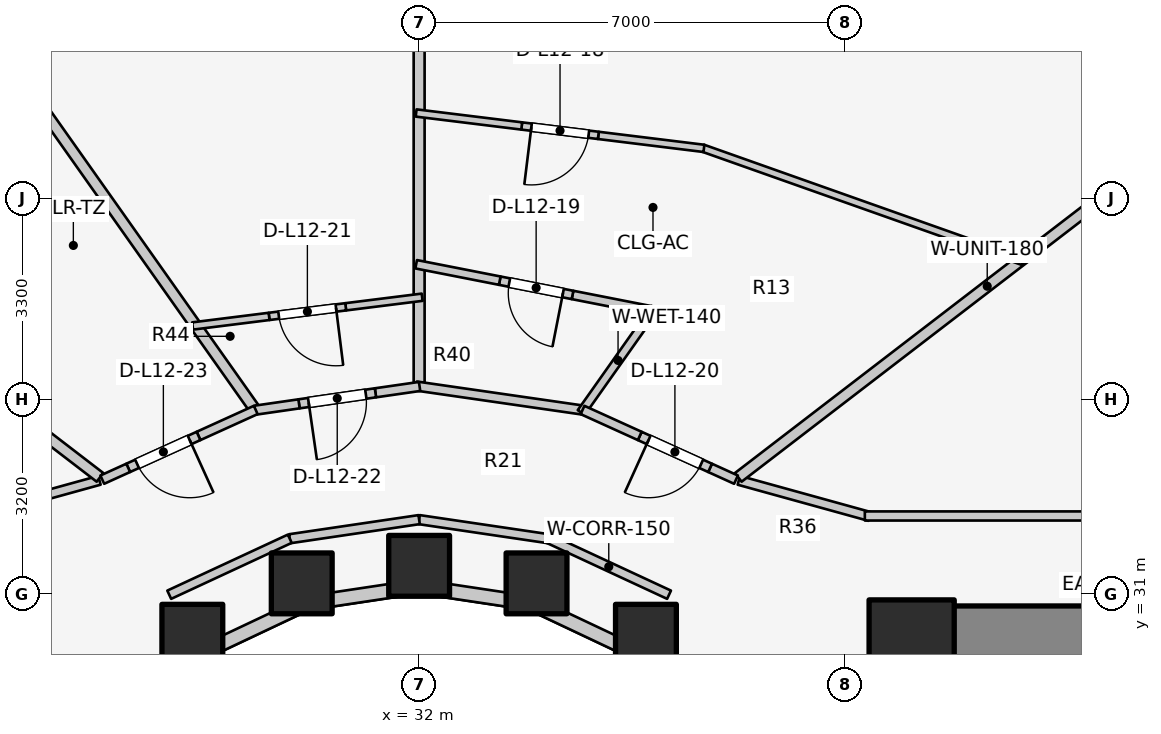
"""IFC4 building model, lengths in metres.
Left out: names, types, materials, properties, quantities, classifications, styles, units other than length and angle.
Written with IfcOpenShell. Run it as: python <this file> out.ifc"""

import sys

from ifc_helpers import new_model, si_unit, direction, frame, frame_2d, origin, origin_2d, place, context, subcontext, project, spatial, rectangle, extrude, element, fill, save


model = new_model("IFC4")
c1 = context("Model", 3, precision=1e-05, world=origin(), true_north=direction((0.0, 1.0)))
c2 = subcontext(c1, "Body", "Model", "MODEL_VIEW")
j1 = project(units=[si_unit("LENGTHUNIT", "METRE"), si_unit("PLANEANGLEUNIT", "RADIAN")], contexts=[c1])
p1 = place(None, origin())
s1 = spatial("IfcSite", under=j1, at=p1, CompositionType="ELEMENT")
p2 = place(p1, origin())
s2 = spatial("IfcBuilding", under=s1, at=p2, CompositionType="ELEMENT")
p3 = place(p2, frame((0.0, 0.0, 43.1)))
s3 = spatial("IfcBuildingStorey", under=s2, at=p3, CompositionType="ELEMENT", Elevation=43.1)
p4 = place(p3, frame((39.85, 30.35, 0.0), z_axis=(0.0, 0.0, 1.0), x_axis=(1.0, 0.0, 0.0)))
e1 = element("IfcWall", 1, at=p4, inside=s3, PredefinedType="SHEAR", context=c2, shape_type="SweptSolid", body=[
    extrude(rectangle(XDim=4.5, YDim=0.9, at=frame_2d((2.25, 0.0))), origin(), (0.0, 0.0, 1.0), 3.1),
])
p5 = place(p3, frame((40.1, 30.2, 0.0), z_axis=(0.0, 0.0, 1.0), x_axis=(1.0, 0.0, 0.0)))
e2 = element("IfcColumn", 2, at=p5, inside=s3, PredefinedType="COLUMN", context=c2, shape_type="SweptSolid", body=[
    extrude(rectangle(XDim=1.4, YDim=1.4, at=origin_2d()), origin(), (0.0, 0.0, 1.0), 3.1),
])
for number, where, z_axis, x_axis in (
    (3, (35.73, 30.327, 0.0), (0.0, 0.0, 1.0), (1.0, 0.0, 0.0)),
    (4, (33.931, 31.172, 0.0), (0.0, 0.0, 1.0), (1.0, 0.0, 0.0)),
    (5, (32.0, 31.46, 0.0), (0.0, 0.0, 1.0), (1.0, 0.0, 0.0)),
    (6, (30.069, 31.172, 0.0), (0.0, 0.0, 1.0), (1.0, 0.0, 0.0)),
    (7, (28.27, 30.327, 0.0), (0.0, 0.0, 1.0), (1.0, 0.0, 0.0)),
):
    element("IfcColumn", number, at=place(p3, frame(where, z_axis=z_axis, x_axis=x_axis)), inside=s3, PredefinedType="COLUMN", context=c2, shape_type="SweptSolid", body=[
        extrude(rectangle(XDim=1.0, YDim=1.0, at=origin_2d()), origin(), (0.0, 0.0, 1.0), 3.1),
    ])
p6 = place(p3, frame((37.035, 28.742, 0.0), z_axis=(0.0, 0.0, 1.0), x_axis=(-0.752576694707, 0.658504607869, 0.0)))
e8 = element("IfcWall", 8, at=p6, inside=s3, PredefinedType="STANDARD", context=c2, shape_type="SweptSolid", body=[
    extrude(rectangle(XDim=1.959, YDim=0.23, at=frame_2d((0.98, 0.0))), origin(), (0.0, 0.0, 1.0), 1.22),
])
p7 = place(p3, frame((35.56, 30.032, 0.0), z_axis=(0.0, 0.0, 1.0), x_axis=(-0.904179699603, 0.427152280606, 0.0)))
e9 = element("IfcWall", 9, at=p7, inside=s3, PredefinedType="STANDARD", context=c2, shape_type="SweptSolid", body=[
    extrude(rectangle(XDim=1.899, YDim=0.23, at=frame_2d((0.95, 0.0))), origin(), (0.0, 0.0, 1.0), 1.22),
])
for number, where, z_axis, x_axis in (
    (10, (33.843, 30.843, 0.0), (0.0, 0.0, 1.0), (-0.989, 0.149, 0.0)),
    (11, (32.0, 31.12, 0.0), (0.0, 0.0, 1.0), (-0.989, -0.149, 0.0)),
):
    element("IfcWall", number, at=place(p3, frame(where, z_axis=z_axis, x_axis=x_axis)), inside=s3, PredefinedType="STANDARD", context=c2, shape_type="SweptSolid", body=[
        extrude(rectangle(XDim=1.864, YDim=0.23, at=frame_2d((0.932, 0.0))), origin(), (0.0, 0.0, 1.0), 1.22),
    ])
p8 = place(p3, frame((30.157, 30.843, 0.0), z_axis=(0.0, 0.0, 1.0), x_axis=(-0.904179699603, -0.427152280606, 0.0)))
e12 = element("IfcWall", 12, at=p8, inside=s3, PredefinedType="STANDARD", context=c2, shape_type="SweptSolid", body=[
    extrude(rectangle(XDim=1.899, YDim=0.23, at=frame_2d((0.95, 0.0))), origin(), (0.0, 0.0, 1.0), 1.22),
])
p9 = place(p3, frame((28.44, 30.032, 0.0), z_axis=(0.0, 0.0, 1.0), x_axis=(-0.752576694707, -0.658504607869, 0.0)))
e13 = element("IfcWall", 13, at=p9, inside=s3, PredefinedType="STANDARD", context=c2, shape_type="SweptSolid", body=[
    extrude(rectangle(XDim=1.959, YDim=0.23, at=frame_2d((0.98, 0.0))), origin(), (0.0, 0.0, 1.0), 1.22),
])
p10 = place(p3, frame((36.11, 30.985, 0.0), z_axis=(0.0, 0.0, 1.0), x_axis=(-0.906943449489, 0.421252393975, 0.0)))
e14 = element("IfcWall", 14, at=p10, inside=s3, PredefinedType="PARTITIONING", context=c2, shape_type="SweptSolid", body=[
    extrude(rectangle(XDim=2.186, YDim=0.15, at=frame_2d((1.093, 0.0))), origin(), (0.0, 0.0, 1.0), 1.22),
])
for number, where, z_axis, x_axis in (
    (15, (34.127, 31.906, 0.0), (0.0, 0.0, 1.0), (-0.989, 0.146, 0.0)),
    (16, (32.0, 32.22, 0.0), (0.0, 0.0, 1.0), (-0.989, -0.146, 0.0)),
):
    element("IfcWall", number, at=place(p3, frame(where, z_axis=z_axis, x_axis=x_axis)), inside=s3, PredefinedType="PARTITIONING", context=c2, shape_type="SweptSolid", body=[
        extrude(rectangle(XDim=2.151, YDim=0.15, at=frame_2d((1.075, 0.0))), origin(), (0.0, 0.0, 1.0), 1.22),
    ])
p11 = place(p3, frame((29.873, 31.906, 0.0), z_axis=(0.0, 0.0, 1.0), x_axis=(-0.906943449489, -0.421252393975, 0.0)))
e17 = element("IfcWall", 17, at=p11, inside=s3, PredefinedType="PARTITIONING", context=c2, shape_type="SweptSolid", body=[
    extrude(rectangle(XDim=2.186, YDim=0.15, at=frame_2d((1.093, 0.0))), origin(), (0.0, 0.0, 1.0), 1.22),
])
p12 = place(p3, frame((37.258, 32.867, 0.0), z_axis=(0.0, 0.0, 1.0), x_axis=(0.963833843713, -0.266503886865, 0.0)))
e18 = element("IfcWall", 18, at=p12, inside=s3, PredefinedType="PARTITIONING", context=c2, shape_type="SweptSolid", body=[
    extrude(rectangle(XDim=2.232, YDim=0.15, at=frame_2d((1.116, 0.0))), origin(), (0.0, 0.0, 1.0), 1.22),
])
p13 = place(p3, frame((39.33, 32.28, 0.0), z_axis=(0.0, 0.0, 1.0), x_axis=(1.0, 0.0, 0.0)))
e19 = element("IfcWall", 19, at=p13, inside=s3, PredefinedType="PARTITIONING", context=c2, shape_type="SweptSolid", body=[
    extrude(rectangle(XDim=5.06, YDim=0.15, at=frame_2d((2.53, 0.0))), origin(), (0.0, 0.0, 1.0), 1.22),
])
p14 = place(p3, frame((26.742, 32.867, 0.0), z_axis=(0.0, 0.0, 1.0), x_axis=(-0.963833843713, -0.266503886865, 0.0)))
e20 = element("IfcWall", 20, at=p14, inside=s3, PredefinedType="PARTITIONING", context=c2, shape_type="SweptSolid", body=[
    extrude(rectangle(XDim=2.232, YDim=0.15, at=frame_2d((1.116, 0.0))), origin(), (0.0, 0.0, 1.0), 1.22),
])
p15 = place(p3, frame((37.249, 32.915, 0.0), z_axis=(0.0, 0.0, 1.0), x_axis=(0.793181014702, 0.608985942298, 0.0)))
e21 = element("IfcWall", 21, at=p15, inside=s3, PredefinedType="PARTITIONING", context=c2, shape_type="SweptSolid", body=[
    extrude(rectangle(XDim=10.324, YDim=0.18, at=frame_2d((5.162, 0.0))), origin(), (0.0, 0.0, 1.0), 1.22),
])
p16 = place(p3, frame((32.0, 34.465, 0.0), z_axis=(0.0, 0.0, 1.0), x_axis=(0.0, 1.0, 0.0)))
e22 = element("IfcWall", 22, at=p16, inside=s3, PredefinedType="PARTITIONING", context=c2, shape_type="SweptSolid", body=[
    extrude(rectangle(XDim=7.835, YDim=0.18, at=frame_2d((3.917, 0.0))), origin(), (0.0, 0.0, 1.0), 1.22),
])
p17 = place(p3, frame((29.274, 34.066, 0.0), z_axis=(0.0, 0.0, 1.0), x_axis=(-0.577036915124, 0.816718065543, 0.0)))
e23 = element("IfcWall", 23, at=p17, inside=s3, PredefinedType="PARTITIONING", context=c2, shape_type="SweptSolid", body=[
    extrude(rectangle(XDim=9.131, YDim=0.18, at=frame_2d((4.565, 0.0))), origin(), (0.0, 0.0, 1.0), 1.22),
])
p18 = place(p3, frame((26.751, 32.915, 0.0), z_axis=(0.0, 0.0, 1.0), x_axis=(-0.793181014702, 0.608985942298, 0.0)))
e24 = element("IfcWall", 24, at=p18, inside=s3, PredefinedType="PARTITIONING", context=c2, shape_type="SweptSolid", body=[
    extrude(rectangle(XDim=10.324, YDim=0.18, at=frame_2d((5.162, 0.0))), origin(), (0.0, 0.0, 1.0), 1.22),
])
p19 = place(p3, frame((41.938, 36.462, 0.0), z_axis=(0.0, 0.0, 1.0), x_axis=(-0.942654689305, 0.333769586287, 0.0)))
e25 = element("IfcWall", 25, at=p19, inside=s3, PredefinedType="MOVABLE", context=c2, shape_type="SweptSolid", body=[
    extrude(rectangle(XDim=5.594, YDim=0.12, at=frame_2d((2.797, 0.0))), origin(), (0.0, 0.0, 1.0), 1.22),
])
p20 = place(p3, frame((36.684, 38.325, 0.0), z_axis=(0.0, 0.0, 1.0), x_axis=(-0.992516476292, 0.122110786945, 0.0)))
e26 = element("IfcWall", 26, at=p20, inside=s3, PredefinedType="MOVABLE", context=c2, shape_type="SweptSolid", body=[
    extrude(rectangle(XDim=1.75, YDim=0.12, at=frame_2d((0.875, 0.0))), origin(), (0.0, 0.0, 1.0), 2.575),
])
p21 = place(p3, frame((34.948, 38.539, 0.0), z_axis=(0.0, 0.0, 1.0), x_axis=(-0.992544679326, 0.121881333855, 0.0)))
e27 = element("IfcWall", 27, at=p21, inside=s3, PredefinedType="MOVABLE", context=c2, shape_type="SweptSolid", body=[
    extrude(rectangle(XDim=1.27, YDim=0.12, at=frame_2d((0.635, 0.0))), origin(), (0.0, 0.0, 1.0), 2.575),
])
p22 = place(p21, frame((0.16, 0.0, 0.0)))
e28 = element("IfcOpeningElement", 28, at=p22, cuts=e27, PredefinedType="OPENING", context=c2, shape_type="SweptSolid", body=[
    extrude(rectangle(XDim=0.95, YDim=2.1, at=frame_2d((0.475, 1.05))), frame((0.0, 0.07, 0.0), z_axis=(0.0, -1.0, 0.0), x_axis=(1.0, 0.0, 0.0)), (0.0, 0.0, 1.0), 0.14),
])
p23 = place(p3, frame((33.687, 38.694, 0.0), z_axis=(0.0, 0.0, 1.0), x_axis=(-0.992518556774, 0.122093875605, 0.0)))
e29 = element("IfcWall", 29, at=p23, inside=s3, PredefinedType="MOVABLE", context=c2, shape_type="SweptSolid", body=[
    extrude(rectangle(XDim=1.75, YDim=0.12, at=frame_2d((0.875, 0.0))), origin(), (0.0, 0.0, 1.0), 1.22),
])
p24 = place(p3, frame((34.744, 34.014, 0.0), z_axis=(0.0, 0.0, 1.0), x_axis=(-0.989761784218, 0.142729150844, 0.0)))
e30 = element("IfcWall", 30, at=p24, inside=s3, PredefinedType="PARTITIONING", context=c2, shape_type="SweptSolid", body=[
    extrude(rectangle(XDim=2.822, YDim=0.15, at=frame_2d((1.411, 0.0))), origin(), (0.0, 0.0, 1.0), 1.22),
])
p25 = place(p3, frame((34.665, 33.98, 0.0), z_axis=(0.0, 0.0, 1.0), x_axis=(0.577139575342, 0.816645523207, 0.0)))
e31 = element("IfcWall", 31, at=p25, inside=s3, PredefinedType="PLUMBINGWALL", context=c2, shape_type="SweptSolid", body=[
    extrude(rectangle(XDim=2.1, YDim=0.14, at=frame_2d((1.05, 0.0))), origin(), (0.0, 0.0, 1.0), 2.575),
])
p26 = place(p3, frame((35.897, 35.645, 0.0), z_axis=(0.0, 0.0, 1.0), x_axis=(-0.981284705137, 0.192562528712, 0.0)))
e32 = element("IfcWall", 32, at=p26, inside=s3, PredefinedType="PLUMBINGWALL", context=c2, shape_type="SweptSolid", body=[
    extrude(rectangle(XDim=1.401, YDim=0.14, at=frame_2d((0.7, 0.0))), origin(), (0.0, 0.0, 1.0), 1.22),
])
p27 = place(p3, frame((34.523, 35.915, 0.0), z_axis=(0.0, 0.0, 1.0), x_axis=(-0.981252199958, 0.192728098829, 0.0)))
e33 = element("IfcWall", 33, at=p27, inside=s3, PredefinedType="PLUMBINGWALL", context=c2, shape_type="SweptSolid", body=[
    extrude(rectangle(XDim=1.22, YDim=0.14, at=frame_2d((0.61, 0.0))), origin(), (0.0, 0.0, 1.0), 2.575),
])
p28 = place(p27, frame((0.16, 0.0, 0.0)))
e34 = element("IfcOpeningElement", 34, at=p28, cuts=e33, PredefinedType="OPENING", context=c2, shape_type="SweptSolid", body=[
    extrude(rectangle(XDim=0.9, YDim=2.1, at=frame_2d((0.45, 1.05))), frame((0.0, 0.08, 0.0), z_axis=(0.0, -1.0, 0.0), x_axis=(1.0, 0.0, 0.0)), (0.0, 0.0, 1.0), 0.16),
])
p29 = place(p3, frame((33.326, 36.15, 0.0), z_axis=(0.0, 0.0, 1.0), x_axis=(-0.981284705137, 0.192562528712, 0.0)))
e35 = element("IfcWall", 35, at=p29, inside=s3, PredefinedType="PLUMBINGWALL", context=c2, shape_type="SweptSolid", body=[
    extrude(rectangle(XDim=1.401, YDim=0.14, at=frame_2d((0.7, 0.0))), origin(), (0.0, 0.0, 1.0), 1.22),
])
p30 = place(p3, frame((37.211, 32.877, 0.0), z_axis=(0.0, 0.0, 1.0), x_axis=(-0.910580557663, 0.413331644091, 0.0)))
e36 = element("IfcWall", 36, at=p30, inside=s3, PredefinedType="PARTITIONING", context=c2, shape_type="SweptSolid", body=[
    extrude(rectangle(XDim=0.469, YDim=0.15, at=frame_2d((0.234, 0.0))), origin(), (0.0, 0.0, 1.0), 2.575),
])
p31 = place(p3, frame((36.785, 33.071, 0.0), z_axis=(0.0, 0.0, 1.0), x_axis=(-0.910491529429, 0.413527719553, 0.0)))
e37 = element("IfcWall", 37, at=p31, inside=s3, PredefinedType="PARTITIONING", context=c2, shape_type="SweptSolid", body=[
    extrude(rectangle(XDim=1.27, YDim=0.15, at=frame_2d((0.635, 0.0))), origin(), (0.0, 0.0, 1.0), 2.16),
])
p32 = place(p31, frame((0.16, 0.0, 0.0)))
e38 = element("IfcOpeningElement", 38, at=p32, cuts=e37, PredefinedType="OPENING", context=c2, shape_type="SweptSolid", body=[
    extrude(rectangle(XDim=0.95, YDim=2.1, at=frame_2d((0.475, 1.05))), frame((0.0, 0.085, 0.0), z_axis=(0.0, -1.0, 0.0), x_axis=(1.0, 0.0, 0.0)), (0.0, 0.0, 1.0), 0.17),
])
p33 = place(p3, frame((35.628, 33.596, 0.0), z_axis=(0.0, 0.0, 1.0), x_axis=(-0.910657491524, 0.413162114831, 0.0)))
e39 = element("IfcWall", 39, at=p33, inside=s3, PredefinedType="PARTITIONING", context=c2, shape_type="SweptSolid", body=[
    extrude(rectangle(XDim=1.033, YDim=0.15, at=frame_2d((0.517, 0.0))), origin(), (0.0, 0.0, 1.0), 1.22),
])
p34 = place(p3, frame((32.05, 35.877, 0.0), z_axis=(0.0, 0.0, 1.0), x_axis=(-0.992251181548, -0.124248109512, 0.0)))
e40 = element("IfcWall", 40, at=p34, inside=s3, PredefinedType="MOVABLE", context=c2, shape_type="SweptSolid", body=[
    extrude(rectangle(XDim=1.267, YDim=0.12, at=frame_2d((0.634, 0.0))), origin(), (0.0, 0.0, 1.0), 1.22),
])
p35 = place(p3, frame((30.792, 35.72, 0.0), z_axis=(0.0, 0.0, 1.0), x_axis=(-0.992257157897, -0.124200372796, 0.0)))
e41 = element("IfcWall", 41, at=p35, inside=s3, PredefinedType="MOVABLE", context=c2, shape_type="SweptSolid", body=[
    extrude(rectangle(XDim=1.27, YDim=0.12, at=frame_2d((0.635, 0.0))), origin(), (0.0, 0.0, 1.0), 2.575),
])
p36 = place(p35, frame((0.16, 0.0, 0.0)))
e42 = element("IfcOpeningElement", 42, at=p36, cuts=e41, PredefinedType="OPENING", context=c2, shape_type="SweptSolid", body=[
    extrude(rectangle(XDim=0.95, YDim=2.1, at=frame_2d((0.475, 1.05))), frame((0.0, 0.07, 0.0), z_axis=(0.0, -1.0, 0.0), x_axis=(1.0, 0.0, 0.0)), (0.0, 0.0, 1.0), 0.14),
])
p37 = place(p3, frame((29.532, 35.562, 0.0), z_axis=(0.0, 0.0, 1.0), x_axis=(-0.992227415201, -0.124437761642, 0.0)))
e43 = element("IfcWall", 43, at=p37, inside=s3, PredefinedType="MOVABLE", context=c2, shape_type="SweptSolid", body=[
    extrude(rectangle(XDim=1.267, YDim=0.12, at=frame_2d((0.634, 0.0))), origin(), (0.0, 0.0, 1.0), 2.575),
])
p38 = place(p3, frame((32.007, 34.41, 0.0), z_axis=(0.0, 0.0, 1.0), x_axis=(-0.989795766197, -0.142493302365, 0.0)))
e44 = element("IfcWall", 44, at=p38, inside=s3, PredefinedType="PARTITIONING", context=c2, shape_type="SweptSolid", body=[
    extrude(rectangle(XDim=0.733, YDim=0.15, at=frame_2d((0.367, 0.0))), origin(), (0.0, 0.0, 1.0), 1.22),
])
p39 = place(p3, frame((31.281, 34.305, 0.0), z_axis=(0.0, 0.0, 1.0), x_axis=(-0.989721405299, -0.14300888047, 0.0)))
e45 = element("IfcWall", 45, at=p39, inside=s3, PredefinedType="PARTITIONING", context=c2, shape_type="SweptSolid", body=[
    extrude(rectangle(XDim=1.27, YDim=0.15, at=frame_2d((0.635, 0.0))), origin(), (0.0, 0.0, 1.0), 2.575),
])
p40 = place(p39, frame((0.16, 0.0, 0.0)))
e46 = element("IfcOpeningElement", 46, at=p40, cuts=e45, PredefinedType="OPENING", context=c2, shape_type="SweptSolid", body=[
    extrude(rectangle(XDim=0.95, YDim=2.1, at=frame_2d((0.475, 1.05))), frame((0.0, 0.085, 0.0), z_axis=(0.0, -1.0, 0.0), x_axis=(1.0, 0.0, 0.0)), (0.0, 0.0, 1.0), 0.17),
])
p41 = place(p3, frame((30.024, 34.124, 0.0), z_axis=(0.0, 0.0, 1.0), x_axis=(-0.98974875873, -0.142819447526, 0.0)))
e47 = element("IfcWall", 47, at=p41, inside=s3, PredefinedType="PARTITIONING", context=c2, shape_type="SweptSolid", body=[
    extrude(rectangle(XDim=0.733, YDim=0.15, at=frame_2d((0.367, 0.0))), origin(), (0.0, 0.0, 1.0), 2.575),
])
p42 = place(p3, frame((29.313, 34.023, 0.0), z_axis=(0.0, 0.0, 1.0), x_axis=(-0.910657491524, -0.413162114831, 0.0)))
e48 = element("IfcWall", 48, at=p42, inside=s3, PredefinedType="PARTITIONING", context=c2, shape_type="SweptSolid", body=[
    extrude(rectangle(XDim=1.033, YDim=0.15, at=frame_2d((0.517, 0.0))), origin(), (0.0, 0.0, 1.0), 1.22),
])
p43 = place(p3, frame((28.372, 33.596, 0.0), z_axis=(0.0, 0.0, 1.0), x_axis=(-0.910491529429, -0.413527719553, 0.0)))
e49 = element("IfcWall", 49, at=p43, inside=s3, PredefinedType="PARTITIONING", context=c2, shape_type="SweptSolid", body=[
    extrude(rectangle(XDim=1.27, YDim=0.15, at=frame_2d((0.635, 0.0))), origin(), (0.0, 0.0, 1.0), 2.16),
])
p44 = place(p43, frame((0.16, 0.0, 0.0)))
e50 = element("IfcOpeningElement", 50, at=p44, cuts=e49, PredefinedType="OPENING", context=c2, shape_type="SweptSolid", body=[
    extrude(rectangle(XDim=0.95, YDim=2.1, at=frame_2d((0.475, 1.05))), frame((0.0, 0.085, 0.0), z_axis=(0.0, -1.0, 0.0), x_axis=(1.0, 0.0, 0.0)), (0.0, 0.0, 1.0), 0.17),
])
p45 = place(p3, frame((27.215, 33.071, 0.0), z_axis=(0.0, 0.0, 1.0), x_axis=(-0.910580557663, -0.413331644091, 0.0)))
e51 = element("IfcWall", 51, at=p45, inside=s3, PredefinedType="PARTITIONING", context=c2, shape_type="SweptSolid", body=[
    extrude(rectangle(XDim=0.469, YDim=0.15, at=frame_2d((0.234, 0.0))), origin(), (0.0, 0.0, 1.0), 2.575),
])
p46 = place(p22, origin())
e52 = element("IfcDoor", 52, at=p46, inside=s3, OperationType="SINGLE_SWING_RIGHT", PredefinedType="DOOR", context=c2, shape_type="SweptSolid", body=[
    extrude(rectangle(XDim=0.95, YDim=2.1, at=frame_2d((0.475, 1.05))), frame((0.0, 0.025, 0.0), z_axis=(0.0, -1.0, 0.0), x_axis=(1.0, 0.0, 0.0)), (0.0, 0.0, 1.0), 0.05),
])
fill(e28, e52)
p47 = place(p28, origin())
e53 = element("IfcDoor", 53, at=p47, inside=s3, OperationType="SINGLE_SWING_LEFT", PredefinedType="DOOR", context=c2, shape_type="SweptSolid", body=[
    extrude(rectangle(XDim=0.9, YDim=2.1, at=frame_2d((0.45, 1.05))), frame((0.0, 0.025, 0.0), z_axis=(0.0, -1.0, 0.0), x_axis=(1.0, 0.0, 0.0)), (0.0, 0.0, 1.0), 0.05),
])
fill(e34, e53)
p48 = place(p32, origin())
e54 = element("IfcDoor", 54, at=p48, inside=s3, OperationType="SINGLE_SWING_RIGHT", PredefinedType="DOOR", context=c2, shape_type="SweptSolid", body=[
    extrude(rectangle(XDim=0.95, YDim=2.1, at=frame_2d((0.475, 1.05))), frame((0.0, 0.025, 0.0), z_axis=(0.0, -1.0, 0.0), x_axis=(1.0, 0.0, 0.0)), (0.0, 0.0, 1.0), 0.05),
])
fill(e38, e54)
p49 = place(p36, origin())
e55 = element("IfcDoor", 55, at=p49, inside=s3, OperationType="SINGLE_SWING_LEFT", PredefinedType="DOOR", context=c2, shape_type="SweptSolid", body=[
    extrude(rectangle(XDim=0.95, YDim=2.1, at=frame_2d((0.475, 1.05))), frame((0.0, 0.025, 0.0), z_axis=(0.0, -1.0, 0.0), x_axis=(1.0, 0.0, 0.0)), (0.0, 0.0, 1.0), 0.05),
])
fill(e42, e55)
p50 = place(p40, origin())
e56 = element("IfcDoor", 56, at=p50, inside=s3, OperationType="SINGLE_SWING_RIGHT", PredefinedType="DOOR", context=c2, shape_type="SweptSolid", body=[
    extrude(rectangle(XDim=0.95, YDim=2.1, at=frame_2d((0.475, 1.05))), frame((0.0, 0.025, 0.0), z_axis=(0.0, -1.0, 0.0), x_axis=(1.0, 0.0, 0.0)), (0.0, 0.0, 1.0), 0.05),
])
fill(e46, e56)
p51 = place(p44, origin())
e57 = element("IfcDoor", 57, at=p51, inside=s3, OperationType="SINGLE_SWING_LEFT", PredefinedType="DOOR", context=c2, shape_type="SweptSolid", body=[
    extrude(rectangle(XDim=0.95, YDim=2.1, at=frame_2d((0.475, 1.05))), frame((0.0, 0.025, 0.0), z_axis=(0.0, -1.0, 0.0), x_axis=(1.0, 0.0, 0.0)), (0.0, 0.0, 1.0), 0.05),
])
fill(e50, e57)
save(model, sys.argv[1])
